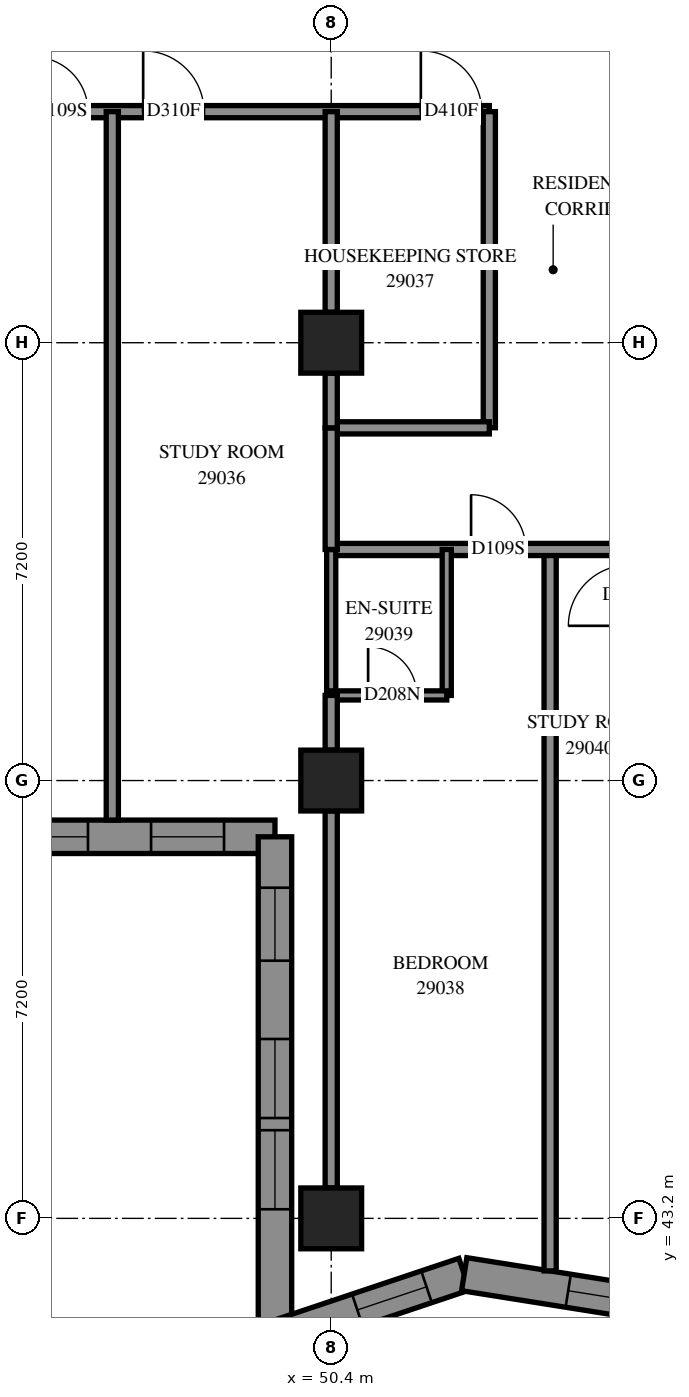
"""IFC4 building model, lengths in metres.
Left out: names, types, materials, properties, quantities, classifications, styles, units other than length and angle.
Written with IfcOpenShell. Run it as: python <this file> out.ifc"""

import sys

from ifc_helpers import new_model, si_unit, direction, frame, frame_2d, origin, origin_2d, place, context, subcontext, project, spatial, polyline, rectangle, outline, extrude, element, fill, save


model = new_model("IFC4")
c1 = context("Model", 3, precision=1e-05, world=origin(), true_north=direction((0.0, 1.0)))
c2 = subcontext(c1, "Body", "Model", "MODEL_VIEW")
j1 = project(units=[si_unit("LENGTHUNIT", "METRE"), si_unit("PLANEANGLEUNIT", "RADIAN")], contexts=[c1])
p1 = place(None, origin())
s1 = spatial("IfcSite", under=j1, at=p1, CompositionType="ELEMENT")
p2 = place(p1, origin())
s2 = spatial("IfcBuilding", under=s1, at=p2, CompositionType="ELEMENT")
p3 = place(p2, frame((0.0, 0.0, 108.4)))
s3 = spatial("IfcBuildingStorey", under=s2, at=p3, CompositionType="ELEMENT", Elevation=108.4)
for number, where, z_axis, x_axis in (
    (1, (50.4, 43.2, 0.0), (0.0, 0.0, 1.0), (1.0, 0.0, 0.0)),
    (2, (50.4, 50.4, 0.0), (0.0, 0.0, 1.0), (1.0, 0.0, 0.0)),
    (3, (50.4, 57.6, 0.0), (0.0, 0.0, 1.0), (1.0, 0.0, 0.0)),
):
    element("IfcColumn", number, at=place(p3, frame(where, z_axis=z_axis, x_axis=x_axis)), inside=s3, PredefinedType="COLUMN", context=c2, shape_type="SweptSolid", body=[
        extrude(rectangle(XDim=1.0, YDim=1.0, at=origin_2d()), origin(), (0.0, 0.0, 1.0), 3.1),
    ])
p4 = place(p3, frame((42.275, 49.475, 0.0), z_axis=(0.0, 0.0, 1.0), x_axis=(1.0, 0.0, 0.0)))
e4 = element("IfcWall", 4, at=p4, inside=s3, PredefinedType="SOLIDWALL", context=c2, shape_type="SweptSolid", body=[
    extrude(outline(polyline([(-0.275, -0.275), (6.925, -0.275), (7.475, 0.275), (0.275, 0.275), (-0.275, -0.275)])), origin(), (0.0, 0.0, 1.0), 3.1),
])
p5 = place(p4, frame((1.325, 0.0, 0.5)))
e5 = element("IfcOpeningElement", 5, at=p5, cuts=e4, PredefinedType="OPENING", context=c2, shape_type="SweptSolid", body=[
    extrude(rectangle(XDim=1.3, YDim=2.45, at=frame_2d((0.65, 1.225))), frame((0.0, 0.285, 0.0), z_axis=(0.0, -1.0, 0.0), x_axis=(1.0, 0.0, 0.0)), (0.0, 0.0, 1.0), 0.57),
])
p6 = place(p4, frame((2.825, 0.0, 0.5)))
e6 = element("IfcOpeningElement", 6, at=p6, cuts=e4, PredefinedType="OPENING", context=c2, shape_type="SweptSolid", body=[
    extrude(rectangle(XDim=1.3, YDim=2.45, at=frame_2d((0.65, 1.225))), frame((0.0, 0.285, 0.0), z_axis=(0.0, -1.0, 0.0), x_axis=(1.0, 0.0, 0.0)), (0.0, 0.0, 1.0), 0.57),
])
p7 = place(p4, frame((5.162, 0.0, 0.5)))
e7 = element("IfcOpeningElement", 7, at=p7, cuts=e4, PredefinedType="OPENING", context=c2, shape_type="SweptSolid", body=[
    extrude(rectangle(XDim=1.2, YDim=2.45, at=frame_2d((0.6, 1.225))), frame((0.0, 0.285, 0.0), z_axis=(0.0, -1.0, 0.0), x_axis=(1.0, 0.0, 0.0)), (0.0, 0.0, 1.0), 0.57),
])
p8 = place(p3, frame((49.475, 49.475, 0.0), z_axis=(0.0, 0.0, 1.0), x_axis=(0.0, -1.0, 0.0)))
e8 = element("IfcWall", 8, at=p8, inside=s3, PredefinedType="SOLIDWALL", context=c2, shape_type="SweptSolid", body=[
    extrude(outline(polyline([(0.275, -0.275), (8.617, -0.275), (7.853, 0.275), (-0.275, 0.275), (0.275, -0.275)])), origin(), (0.0, 0.0, 1.0), 3.1),
])
p9 = place(p8, frame((3.325, 0.0, 0.5)))
e9 = element("IfcOpeningElement", 9, at=p9, cuts=e8, PredefinedType="OPENING", context=c2, shape_type="SweptSolid", body=[
    extrude(rectangle(XDim=1.3, YDim=2.45, at=frame_2d((0.65, 1.225))), frame((0.0, 0.285, 0.0), z_axis=(0.0, -1.0, 0.0), x_axis=(1.0, 0.0, 0.0)), (0.0, 0.0, 1.0), 0.57),
])
p10 = place(p8, frame((4.825, 0.0, 0.5)))
e10 = element("IfcOpeningElement", 10, at=p10, cuts=e8, PredefinedType="OPENING", context=c2, shape_type="SweptSolid", body=[
    extrude(rectangle(XDim=1.3, YDim=2.45, at=frame_2d((0.65, 1.225))), frame((0.0, 0.285, 0.0), z_axis=(0.0, -1.0, 0.0), x_axis=(1.0, 0.0, 0.0)), (0.0, 0.0, 1.0), 0.57),
])
p11 = place(p8, frame((0.838, 0.0, 0.5)))
e11 = element("IfcOpeningElement", 11, at=p11, cuts=e8, PredefinedType="OPENING", context=c2, shape_type="SweptSolid", body=[
    extrude(rectangle(XDim=1.2, YDim=2.45, at=frame_2d((0.6, 1.225))), frame((0.0, 0.285, 0.0), z_axis=(0.0, -1.0, 0.0), x_axis=(1.0, 0.0, 0.0)), (0.0, 0.0, 1.0), 0.57),
])
p12 = place(p3, frame((49.475, 41.24, 0.0), z_axis=(0.0, 0.0, 1.0), x_axis=(0.9482466671, 0.3175346568, 0.0)))
e12 = element("IfcWall", 12, at=p12, inside=s3, PredefinedType="SOLIDWALL", context=c2, shape_type="SweptSolid", body=[
    extrude(outline(polyline([(-0.382, -0.275), (3.214, -0.275), (3.349, 0.275), (0.382, 0.275), (-0.382, -0.275)])), origin(), (0.0, 0.0, 1.0), 3.1),
])
p13 = place(p12, frame((1.429, 0.0, 0.5)))
e13 = element("IfcOpeningElement", 13, at=p13, cuts=e12, PredefinedType="OPENING", context=c2, shape_type="SweptSolid", body=[
    extrude(rectangle(XDim=1.2, YDim=2.45, at=frame_2d((0.6, 1.225))), frame((0.0, 0.285, 0.0), z_axis=(0.0, -1.0, 0.0), x_axis=(1.0, 0.0, 0.0)), (0.0, 0.0, 1.0), 0.57),
])
p14 = place(p3, frame((52.587, 42.282, 0.0), z_axis=(0.0, 0.0, 1.0), x_axis=(0.9876057519, -0.1569550219, 0.0)))
e14 = element("IfcWall", 14, at=p14, inside=s3, PredefinedType="SOLIDWALL", context=c2, shape_type="SweptSolid", body=[
    extrude(outline(polyline([(0.067, -0.275), (3.521, -0.275), (3.433, 0.275), (-0.067, 0.275), (0.067, -0.275)])), origin(), (0.0, 0.0, 1.0), 3.1),
])
p15 = place(p14, frame((1.732, 0.0, 0.5)))
e15 = element("IfcOpeningElement", 15, at=p15, cuts=e14, PredefinedType="OPENING", context=c2, shape_type="SweptSolid", body=[
    extrude(rectangle(XDim=1.2, YDim=2.45, at=frame_2d((0.6, 1.225))), frame((0.0, 0.285, 0.0), z_axis=(0.0, -1.0, 0.0), x_axis=(1.0, 0.0, 0.0)), (0.0, 0.0, 1.0), 0.57),
])
p16 = place(p3, frame((28.8, 61.4, 0.0), z_axis=(0.0, 0.0, 1.0), x_axis=(1.0, 0.0, 0.0)))
e16 = element("IfcWall", 16, at=p16, inside=s3, PredefinedType="PARTITIONING", context=c2, shape_type="SweptSolid", body=[
    extrude(rectangle(XDim=24.2, YDim=0.2, at=frame_2d((12.1, 0.0))), origin(), (0.0, 0.0, 1.0), 3.1),
])
p17 = place(p16, frame((2.3, 0.0, 0.0)))
e17 = element("IfcOpeningElement", 17, at=p17, cuts=e16, PredefinedType="OPENING", context=c2, shape_type="SweptSolid", body=[
    extrude(rectangle(XDim=0.9, YDim=2.1, at=frame_2d((0.45, 1.05))), frame((0.0, 0.11, 0.0), z_axis=(0.0, -1.0, 0.0), x_axis=(1.0, 0.0, 0.0)), (0.0, 0.0, 1.0), 0.22),
])
p18 = place(p16, frame((5.901, 0.0, 0.0)))
e18 = element("IfcOpeningElement", 18, at=p18, cuts=e16, PredefinedType="OPENING", context=c2, shape_type="SweptSolid", body=[
    extrude(rectangle(XDim=0.9, YDim=2.1, at=frame_2d((0.45, 1.05))), frame((0.0, 0.11, 0.0), z_axis=(0.0, -1.0, 0.0), x_axis=(1.0, 0.0, 0.0)), (0.0, 0.0, 1.0), 0.22),
])
p19 = place(p16, frame((11.307, 0.0, 0.0)))
e19 = element("IfcOpeningElement", 19, at=p19, cuts=e16, PredefinedType="OPENING", context=c2, shape_type="SweptSolid", body=[
    extrude(rectangle(XDim=1.0, YDim=2.1, at=frame_2d((0.5, 1.05))), frame((0.0, 0.11, 0.0), z_axis=(0.0, -1.0, 0.0), x_axis=(1.0, 0.0, 0.0)), (0.0, 0.0, 1.0), 0.22),
])
p20 = place(p16, frame((16.7, 0.0, 0.0)))
e20 = element("IfcOpeningElement", 20, at=p20, cuts=e16, PredefinedType="OPENING", context=c2, shape_type="SweptSolid", body=[
    extrude(rectangle(XDim=0.9, YDim=2.1, at=frame_2d((0.45, 1.05))), frame((0.0, 0.11, 0.0), z_axis=(0.0, -1.0, 0.0), x_axis=(1.0, 0.0, 0.0)), (0.0, 0.0, 1.0), 0.22),
])
p21 = place(p16, frame((18.508, 0.0, 0.0)))
e21 = element("IfcOpeningElement", 21, at=p21, cuts=e16, PredefinedType="OPENING", context=c2, shape_type="SweptSolid", body=[
    extrude(rectangle(XDim=1.0, YDim=2.1, at=frame_2d((0.5, 1.05))), frame((0.0, 0.11, 0.0), z_axis=(0.0, -1.0, 0.0), x_axis=(1.0, 0.0, 0.0)), (0.0, 0.0, 1.0), 0.22),
])
p22 = place(p16, frame((23.074, 0.0, 0.0)))
e22 = element("IfcOpeningElement", 22, at=p22, cuts=e16, PredefinedType="OPENING", context=c2, shape_type="SweptSolid", body=[
    extrude(rectangle(XDim=1.0, YDim=2.1, at=frame_2d((0.5, 1.05))), frame((0.0, 0.11, 0.0), z_axis=(0.0, -1.0, 0.0), x_axis=(1.0, 0.0, 0.0)), (0.0, 0.0, 1.0), 0.22),
])
p23 = place(p3, frame((54.0, 42.336, 0.0), z_axis=(0.0, 0.0, 1.0), x_axis=(0.0, 1.0, 0.0)))
e23 = element("IfcWall", 23, at=p23, inside=s3, PredefinedType="PARTITIONING", context=c2, shape_type="SweptSolid", body=[
    extrude(rectangle(XDim=11.864, YDim=0.2, at=frame_2d((5.932, 0.0))), origin(), (0.0, 0.0, 1.0), 3.1),
])
p24 = place(p3, frame((46.8, 49.75, 0.0), z_axis=(0.0, 0.0, 1.0), x_axis=(0.0, 1.0, 0.0)))
e24 = element("IfcWall", 24, at=p24, inside=s3, PredefinedType="PARTITIONING", context=c2, shape_type="SweptSolid", body=[
    extrude(rectangle(XDim=11.65, YDim=0.2, at=frame_2d((5.825, 0.0))), origin(), (0.0, 0.0, 1.0), 3.1),
])
p25 = place(p3, frame((50.4, 43.7, 0.0), z_axis=(0.0, 0.0, 1.0), x_axis=(0.0, 1.0, 0.0)))
e25 = element("IfcWall", 25, at=p25, inside=s3, PredefinedType="PARTITIONING", context=c2, shape_type="SweptSolid", body=[
    extrude(rectangle(XDim=6.2, YDim=0.2, at=frame_2d((3.1, 0.0))), origin(), (0.0, 0.0, 1.0), 2.6),
])
p26 = place(p3, frame((53.0, 56.202, 0.0), z_axis=(0.0, 0.0, 1.0), x_axis=(0.0, 1.0, 0.0)))
e26 = element("IfcWall", 26, at=p26, inside=s3, PredefinedType="PARTITIONING", context=c2, shape_type="SweptSolid", body=[
    extrude(rectangle(XDim=5.198, YDim=0.2, at=frame_2d((2.599, 0.0))), origin(), (0.0, 0.0, 1.0), 3.1),
])
p27 = place(p3, frame((50.4, 54.2, 0.0), z_axis=(0.0, 0.0, 1.0), x_axis=(1.0, 0.0, 0.0)))
e27 = element("IfcWall", 27, at=p27, inside=s3, PredefinedType="PARTITIONING", context=c2, shape_type="SweptSolid", body=[
    extrude(rectangle(XDim=4.9, YDim=0.2, at=frame_2d((2.45, 0.0))), origin(), (0.0, 0.0, 1.0), 3.1),
])
p28 = place(p27, frame((2.3, 0.0, 0.0)))
e28 = element("IfcOpeningElement", 28, at=p28, cuts=e27, PredefinedType="OPENING", context=c2, shape_type="SweptSolid", body=[
    extrude(rectangle(XDim=0.9, YDim=2.1, at=frame_2d((0.45, 1.05))), frame((0.0, 0.11, 0.0), z_axis=(0.0, -1.0, 0.0), x_axis=(1.0, 0.0, 0.0)), (0.0, 0.0, 1.0), 0.22),
])
p29 = place(p3, frame((50.4, 58.1, 0.0), z_axis=(0.0, 0.0, 1.0), x_axis=(0.0, 1.0, 0.0)))
e29 = element("IfcWall", 29, at=p29, inside=s3, PredefinedType="PARTITIONING", context=c2, shape_type="SweptSolid", body=[
    extrude(rectangle(XDim=3.3, YDim=0.2, at=frame_2d((1.65, 0.0))), origin(), (0.0, 0.0, 1.0), 3.1),
])
p30 = place(p3, frame((50.4, 56.2, 0.0), z_axis=(0.0, 0.0, 1.0), x_axis=(1.0, 0.0, 0.0)))
e30 = element("IfcWall", 30, at=p30, inside=s3, PredefinedType="PARTITIONING", context=c2, shape_type="SweptSolid", body=[
    extrude(rectangle(XDim=2.6, YDim=0.2, at=frame_2d((1.3, 0.0))), origin(), (0.0, 0.0, 1.0), 3.1),
])
for number, where, z_axis, x_axis in (
    (31, (52.3, 51.8, 0.0), (0.0, 0.0, 1.0), (0.0, 1.0, 0.0)),
    (32, (50.4, 51.8, 0.0), (0.0, 0.0, 1.0), (0.0, 1.0, 0.0)),
):
    element("IfcWall", number, at=place(p3, frame(where, z_axis=z_axis, x_axis=x_axis)), inside=s3, PredefinedType="PARTITIONING", context=c2, shape_type="SweptSolid", body=[
        extrude(rectangle(XDim=2.4, YDim=0.15, at=frame_2d((1.2, 0.0))), origin(), (0.0, 0.0, 1.0), 3.1),
    ])
p31 = place(p3, frame((50.4, 54.2, 0.0), z_axis=(0.0, 0.0, 1.0), x_axis=(0.0, 1.0, 0.0)))
e33 = element("IfcWall", 33, at=p31, inside=s3, PredefinedType="PARTITIONING", context=c2, shape_type="SweptSolid", body=[
    extrude(rectangle(XDim=2.0, YDim=0.2, at=frame_2d((1.0, 0.0))), origin(), (0.0, 0.0, 1.0), 3.1),
])
p32 = place(p3, frame((50.4, 51.8, 0.0), z_axis=(0.0, 0.0, 1.0), x_axis=(1.0, 0.0, 0.0)))
e34 = element("IfcWall", 34, at=p32, inside=s3, PredefinedType="PARTITIONING", context=c2, shape_type="SweptSolid", body=[
    extrude(rectangle(XDim=1.9, YDim=0.15, at=frame_2d((0.95, 0.0))), origin(), (0.0, 0.0, 1.0), 3.1),
])
p33 = place(p32, frame((0.607, 0.0, 0.0)))
e35 = element("IfcOpeningElement", 35, at=p33, cuts=e34, PredefinedType="OPENING", context=c2, shape_type="SweptSolid", body=[
    extrude(rectangle(XDim=0.8, YDim=2.1, at=frame_2d((0.4, 1.05))), frame((0.0, 0.085, 0.0), z_axis=(0.0, -1.0, 0.0), x_axis=(1.0, 0.0, 0.0)), (0.0, 0.0, 1.0), 0.17),
])
for number, where, z_axis, x_axis in (
    (36, (50.4, 50.9, 0.0), (0.0, 0.0, 1.0), (0.0, 1.0, 0.0)),
    (37, (50.4, 56.2, 0.0), (0.0, 0.0, 1.0), (0.0, 1.0, 0.0)),
):
    element("IfcWall", number, at=place(p3, frame(where, z_axis=z_axis, x_axis=x_axis)), inside=s3, PredefinedType="PARTITIONING", context=c2, shape_type="SweptSolid", body=[
        extrude(rectangle(XDim=0.9, YDim=0.2, at=frame_2d((0.45, 0.0))), origin(), (0.0, 0.0, 1.0), 3.1),
    ])
p34 = place(p6, origin())
e38 = element("IfcWindow", 38, at=p34, inside=s3, PartitioningType="SINGLE_PANEL", PredefinedType="WINDOW", context=c2, shape_type="SweptSolid", body=[
    extrude(rectangle(XDim=1.3, YDim=2.45, at=frame_2d((0.65, 1.225))), frame((0.0, 0.155, 0.0), z_axis=(0.0, -1.0, 0.0), x_axis=(1.0, 0.0, 0.0)), (0.0, 0.0, 1.0), 0.06),
])
fill(e6, e38)
p35 = place(p7, origin())
e39 = element("IfcWindow", 39, at=p35, inside=s3, PartitioningType="SINGLE_PANEL", PredefinedType="WINDOW", context=c2, shape_type="SweptSolid", body=[
    extrude(rectangle(XDim=1.2, YDim=2.45, at=frame_2d((0.6, 1.225))), frame((0.0, 0.155, 0.0), z_axis=(0.0, -1.0, 0.0), x_axis=(1.0, 0.0, 0.0)), (0.0, 0.0, 1.0), 0.06),
])
fill(e7, e39)
p36 = place(p9, origin())
e40 = element("IfcWindow", 40, at=p36, inside=s3, PartitioningType="SINGLE_PANEL", PredefinedType="WINDOW", context=c2, shape_type="SweptSolid", body=[
    extrude(rectangle(XDim=1.3, YDim=2.45, at=frame_2d((0.65, 1.225))), frame((0.0, 0.155, 0.0), z_axis=(0.0, -1.0, 0.0), x_axis=(1.0, 0.0, 0.0)), (0.0, 0.0, 1.0), 0.06),
])
fill(e9, e40)
p37 = place(p10, origin())
e41 = element("IfcWindow", 41, at=p37, inside=s3, PartitioningType="SINGLE_PANEL", PredefinedType="WINDOW", context=c2, shape_type="SweptSolid", body=[
    extrude(rectangle(XDim=1.3, YDim=2.45, at=frame_2d((0.65, 1.225))), frame((0.0, 0.155, 0.0), z_axis=(0.0, -1.0, 0.0), x_axis=(1.0, 0.0, 0.0)), (0.0, 0.0, 1.0), 0.06),
])
fill(e10, e41)
p38 = place(p11, origin())
e42 = element("IfcWindow", 42, at=p38, inside=s3, PartitioningType="SINGLE_PANEL", PredefinedType="WINDOW", context=c2, shape_type="SweptSolid", body=[
    extrude(rectangle(XDim=1.2, YDim=2.45, at=frame_2d((0.6, 1.225))), frame((0.0, 0.155, 0.0), z_axis=(0.0, -1.0, 0.0), x_axis=(1.0, 0.0, 0.0)), (0.0, 0.0, 1.0), 0.06),
])
fill(e11, e42)
p39 = place(p13, origin())
e43 = element("IfcWindow", 43, at=p39, inside=s3, PartitioningType="SINGLE_PANEL", PredefinedType="WINDOW", context=c2, shape_type="SweptSolid", body=[
    extrude(rectangle(XDim=1.2, YDim=2.45, at=frame_2d((0.6, 1.225))), frame((0.0, 0.155, 0.0), z_axis=(0.0, -1.0, 0.0), x_axis=(1.0, 0.0, 0.0)), (0.0, 0.0, 1.0), 0.06),
])
fill(e13, e43)
p40 = place(p15, origin())
e44 = element("IfcWindow", 44, at=p40, inside=s3, PartitioningType="SINGLE_PANEL", PredefinedType="WINDOW", context=c2, shape_type="SweptSolid", body=[
    extrude(rectangle(XDim=1.2, YDim=2.45, at=frame_2d((0.6, 1.225))), frame((0.0, 0.155, 0.0), z_axis=(0.0, -1.0, 0.0), x_axis=(1.0, 0.0, 0.0)), (0.0, 0.0, 1.0), 0.06),
])
fill(e15, e44)
p41 = place(p20, origin())
e45 = element("IfcDoor", 45, at=p41, inside=s3, OperationType="SINGLE_SWING_LEFT", PredefinedType="DOOR", context=c2, shape_type="SweptSolid", body=[
    extrude(rectangle(XDim=0.9, YDim=2.1, at=frame_2d((0.45, 1.05))), frame((0.0, 0.025, 0.0), z_axis=(0.0, -1.0, 0.0), x_axis=(1.0, 0.0, 0.0)), (0.0, 0.0, 1.0), 0.05),
])
fill(e20, e45)
p42 = place(p21, origin())
e46 = element("IfcDoor", 46, at=p42, inside=s3, OperationType="SINGLE_SWING_RIGHT", PredefinedType="DOOR", context=c2, shape_type="SweptSolid", body=[
    extrude(rectangle(XDim=1.0, YDim=2.1, at=frame_2d((0.5, 1.05))), frame((0.0, 0.025, 0.0), z_axis=(0.0, -1.0, 0.0), x_axis=(1.0, 0.0, 0.0)), (0.0, 0.0, 1.0), 0.05),
])
fill(e21, e46)
p43 = place(p22, origin())
e47 = element("IfcDoor", 47, at=p43, inside=s3, OperationType="SINGLE_SWING_LEFT", PredefinedType="DOOR", context=c2, shape_type="SweptSolid", body=[
    extrude(rectangle(XDim=1.0, YDim=2.1, at=frame_2d((0.5, 1.05))), frame((0.0, 0.025, 0.0), z_axis=(0.0, -1.0, 0.0), x_axis=(1.0, 0.0, 0.0)), (0.0, 0.0, 1.0), 0.05),
])
fill(e22, e47)
p44 = place(p28, origin())
e48 = element("IfcDoor", 48, at=p44, inside=s3, OperationType="SINGLE_SWING_LEFT", PredefinedType="DOOR", context=c2, shape_type="SweptSolid", body=[
    extrude(rectangle(XDim=0.9, YDim=2.1, at=frame_2d((0.45, 1.05))), frame((0.0, 0.025, 0.0), z_axis=(0.0, -1.0, 0.0), x_axis=(1.0, 0.0, 0.0)), (0.0, 0.0, 1.0), 0.05),
])
fill(e28, e48)
p45 = place(p33, origin())
e49 = element("IfcDoor", 49, at=p45, inside=s3, OperationType="SINGLE_SWING_RIGHT", PredefinedType="DOOR", context=c2, shape_type="SweptSolid", body=[
    extrude(rectangle(XDim=0.8, YDim=2.1, at=frame_2d((0.4, 1.05))), frame((0.0, 0.025, 0.0), z_axis=(0.0, -1.0, 0.0), x_axis=(1.0, 0.0, 0.0)), (0.0, 0.0, 1.0), 0.05),
])
fill(e35, e49)
save(model, sys.argv[1])
